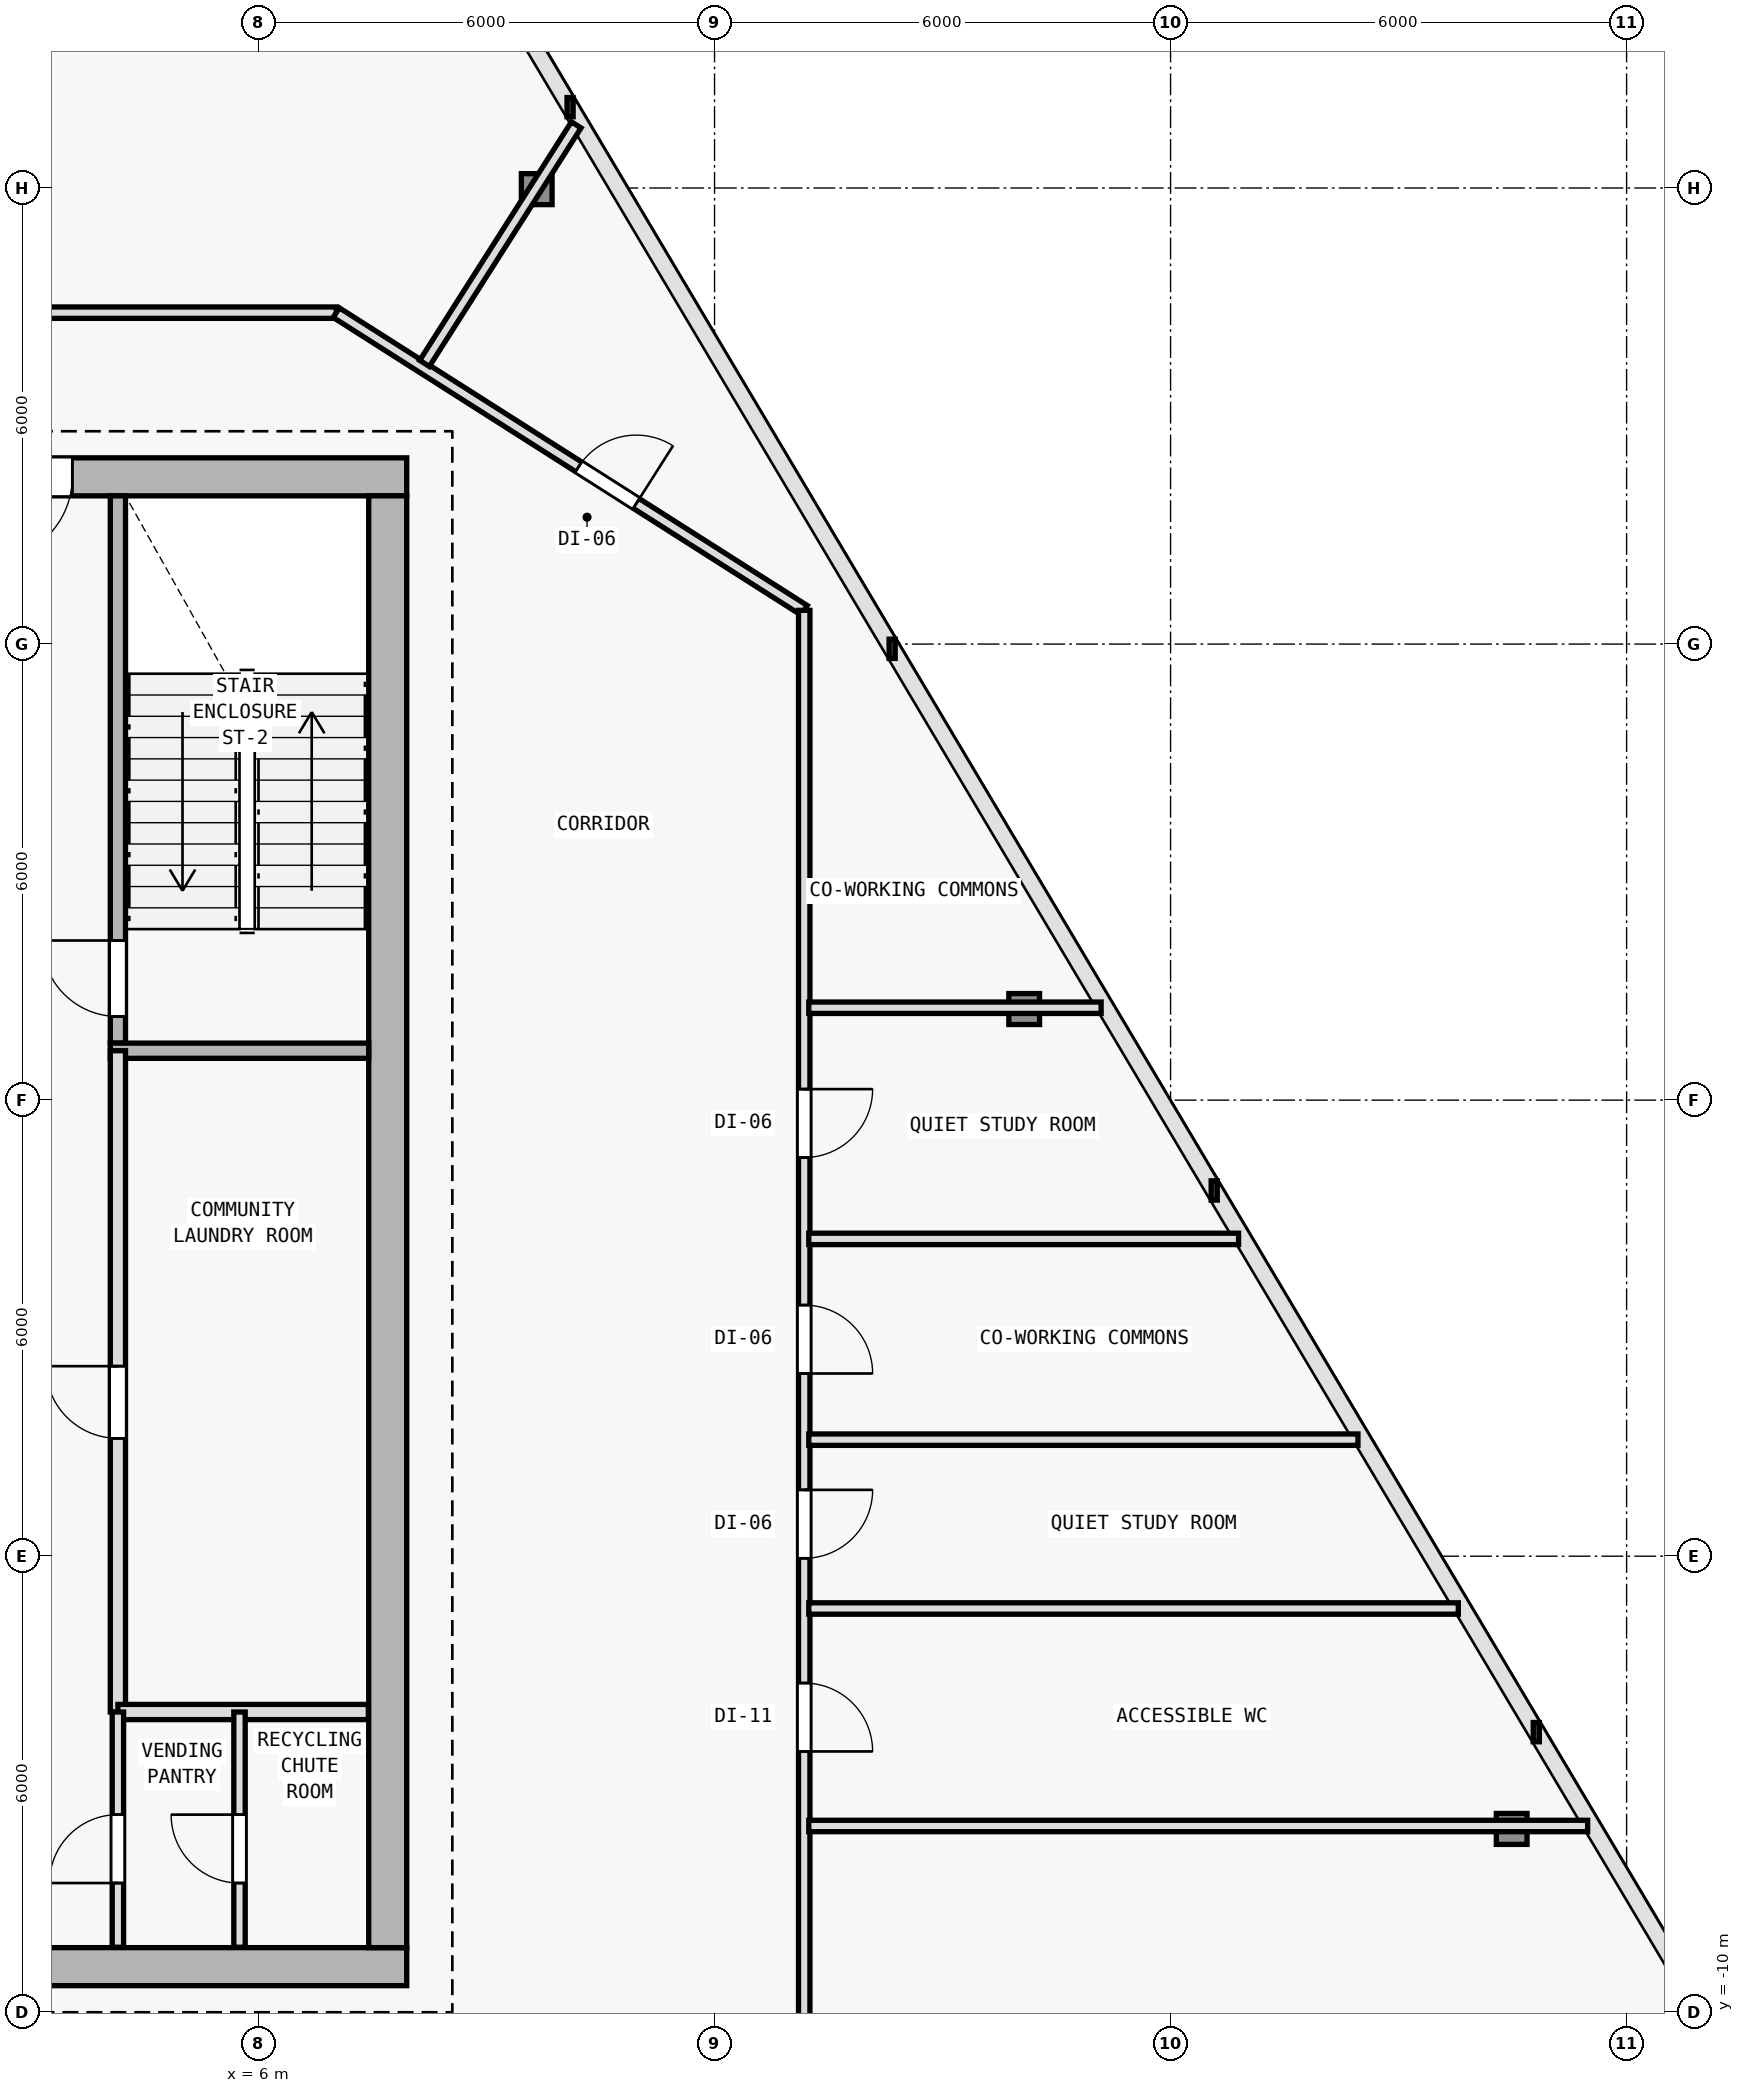
"""IFC4 building model, lengths in metres.
Left out: names, types, materials, properties, quantities, classifications, styles, units other than length and angle.
Written with IfcOpenShell. Run it as: python <this file> out.ifc"""

import sys

from ifc_helpers import new_model, si_unit, direction, frame, frame_2d, origin, origin_2d, place, context, subcontext, project, spatial, rectangle, i_section, extrude, element, fill, save


model = new_model("IFC4")
c1 = context("Model", 3, precision=1e-05, world=origin(), true_north=direction((0.0, 1.0)))
c2 = subcontext(c1, "Body", "Model", "MODEL_VIEW")
j1 = project(units=[si_unit("LENGTHUNIT", "METRE"), si_unit("PLANEANGLEUNIT", "RADIAN")], contexts=[c1])
p1 = place(None, origin())
s1 = spatial("IfcSite", under=j1, at=p1, CompositionType="ELEMENT")
p2 = place(p1, origin())
s2 = spatial("IfcBuilding", under=s1, at=p2, CompositionType="ELEMENT")
p3 = place(p2, frame((0.0, 0.0, 134.1)))
s3 = spatial("IfcBuildingStorey", under=s2, at=p3, CompositionType="ELEMENT", Elevation=134.1)
for number, where, z_axis, x_axis in (
    (1, (7.7, -9.4, 0.0), (0.0, 0.0, 1.0), (1.0, 0.0, 0.0)),
    (2, (7.7, 10.2, 0.0), (0.0, 0.0, 1.0), (1.0, 0.0, 0.0)),
    (3, (7.7, 0.4, 0.0), (0.0, 0.0, 1.0), (1.0, 0.0, 0.0)),
):
    element("IfcColumn", number, at=place(p3, frame(where, z_axis=z_axis, x_axis=x_axis)), inside=s3, PredefinedType="COLUMN", context=c2, shape_type="SweptSolid", body=[
        extrude(i_section(OverallWidth=0.409, OverallDepth=0.425, WebThickness=0.021, FlangeThickness=0.034, FilletRadius=0.015, at=origin_2d()), origin(), (0.0, 0.0, 1.0), 4.5),
    ])
p4 = place(p3, frame((22.488, -7.588, 0.005), z_axis=(-0.020876646911, 0.017288473223, 0.999632569651), x_axis=(-0.637813971185, -0.770190455771, 0.0)))
e4 = element("IfcColumn", 4, at=p4, inside=s3, PredefinedType="COLUMN", context=c2, shape_type="SweptSolid", body=[
    extrude(i_section(OverallWidth=0.404, OverallDepth=0.407, WebThickness=0.017, FlangeThickness=0.028, FilletRadius=0.015, at=origin_2d()), origin(), (0.0, 0.0, 1.0), 4.491),
])
p5 = place(p3, frame((16.074, 3.198, 0.005), z_axis=(-0.015117211909, 0.007612984415, 0.999856745925), x_axis=(-0.449781931574, -0.893138406984, 0.0)))
e5 = element("IfcColumn", 5, at=p5, inside=s3, PredefinedType="COLUMN", context=c2, shape_type="SweptSolid", body=[
    extrude(i_section(OverallWidth=0.404, OverallDepth=0.407, WebThickness=0.017, FlangeThickness=0.028, FilletRadius=0.015, at=origin_2d()), origin(), (0.0, 0.0, 1.0), 4.49),
])
p6 = place(p3, frame((9.66, 13.985, 0.005), z_axis=(-0.009408385968, -0.002012198155, 0.999953715595), x_axis=(0.209143047003, -0.977885057607, 0.0)))
e6 = element("IfcColumn", 6, at=p6, inside=s3, PredefinedType="COLUMN", context=c2, shape_type="SweptSolid", body=[
    extrude(i_section(OverallWidth=0.404, OverallDepth=0.407, WebThickness=0.017, FlangeThickness=0.028, FilletRadius=0.015, at=origin_2d()), origin(), (0.0, 0.0, 1.0), 4.489),
])
p7 = place(p3, frame((-7.95, -9.4, 0.0), z_axis=(0.0, 0.0, 1.0), x_axis=(1.0, 0.0, 0.0)))
e7 = element("IfcWall", 7, at=p7, inside=s3, PredefinedType="SHEAR", context=c2, shape_type="SweptSolid", body=[
    extrude(rectangle(XDim=15.9, YDim=0.5, at=frame_2d((7.95, 0.0))), origin(), (0.0, 0.0, 1.0), 4.25),
])
p8 = place(p7, frame((9.6, 0.0, 0.0)))
e8 = element("IfcOpeningElement", 8, at=p8, cuts=e7, PredefinedType="OPENING", context=c2, shape_type="SweptSolid", body=[
    extrude(rectangle(XDim=1.5, YDim=2.2, at=frame_2d((0.75, 1.1))), frame((0.0, 0.26, 0.0), z_axis=(0.0, -1.0, 0.0), x_axis=(1.0, 0.0, 0.0)), (0.0, 0.0, 1.0), 0.52),
])
p9 = place(p3, frame((7.95, 10.2, 0.0), z_axis=(0.0, 0.0, 1.0), x_axis=(-1.0, 0.0, 0.0)))
e9 = element("IfcWall", 9, at=p9, inside=s3, PredefinedType="SHEAR", context=c2, shape_type="SweptSolid", body=[
    extrude(rectangle(XDim=15.9, YDim=0.5, at=frame_2d((7.95, 0.0))), origin(), (0.0, 0.0, 1.0), 4.25),
])
p10 = place(p9, frame((4.4, 0.0, 0.0)))
e10 = element("IfcOpeningElement", 10, at=p10, cuts=e9, PredefinedType="OPENING", context=c2, shape_type="SweptSolid", body=[
    extrude(rectangle(XDim=1.1, YDim=2.15, at=frame_2d((0.55, 1.075))), frame((0.0, 0.26, 0.0), z_axis=(0.0, -1.0, 0.0), x_axis=(1.0, 0.0, 0.0)), (0.0, 0.0, 1.0), 0.52),
])
p11 = place(p3, frame((7.7, 9.95, 0.0), z_axis=(0.0, 0.0, 1.0), x_axis=(0.0, -1.0, 0.0)))
e11 = element("IfcWall", 11, at=p11, inside=s3, PredefinedType="SHEAR", context=c2, shape_type="SweptSolid", body=[
    extrude(rectangle(XDim=19.1, YDim=0.5, at=frame_2d((9.55, 0.0))), origin(), (0.0, 0.0, 1.0), 4.25),
])
p12 = place(p3, frame((4.15, 2.75, 0.0), z_axis=(0.0, 0.0, 1.0), x_axis=(0.0, 1.0, 0.0)))
e12 = element("IfcWall", 12, at=p12, inside=s3, PredefinedType="SOLIDWALL", context=c2, shape_type="SweptSolid", body=[
    extrude(rectangle(XDim=7.2, YDim=0.2, at=frame_2d((3.6, 0.0))), origin(), (0.0, 0.0, 1.0), 4.25),
])
p13 = place(p12, frame((0.35, 0.0, 0.0)))
e13 = element("IfcOpeningElement", 13, at=p13, cuts=e12, PredefinedType="OPENING", context=c2, shape_type="SweptSolid", body=[
    extrude(rectangle(XDim=1.0, YDim=2.15, at=frame_2d((0.5, 1.075))), frame((0.0, 0.11, 0.0), z_axis=(0.0, -1.0, 0.0), x_axis=(1.0, 0.0, 0.0)), (0.0, 0.0, 1.0), 0.22),
])
p14 = place(p3, frame((4.05, 2.65, 0.0), z_axis=(0.0, 0.0, 1.0), x_axis=(1.0, 0.0, 0.0)))
e14 = element("IfcWall", 14, at=p14, inside=s3, PredefinedType="SOLIDWALL", context=c2, shape_type="SweptSolid", body=[
    extrude(rectangle(XDim=3.4, YDim=0.2, at=frame_2d((1.7, 0.0))), origin(), (0.0, 0.0, 1.0), 4.25),
])
p15 = place(p3, frame((4.15, -6.05, 0.0), z_axis=(0.0, 0.0, 1.0), x_axis=(0.0, 1.0, 0.0)))
e15 = element("IfcWall", 15, at=p15, inside=s3, PredefinedType="SOLIDWALL", context=c2, shape_type="SweptSolid", body=[
    extrude(rectangle(XDim=8.7, YDim=0.2, at=frame_2d((4.35, 0.0))), origin(), (0.0, 0.0, 1.0), 4.25),
])
p16 = place(p15, frame((3.6, 0.0, 0.0)))
e16 = element("IfcOpeningElement", 16, at=p16, cuts=e15, PredefinedType="OPENING", context=c2, shape_type="SweptSolid", body=[
    extrude(rectangle(XDim=0.95, YDim=2.1, at=frame_2d((0.475, 1.05))), frame((0.0, 0.11, 0.0), z_axis=(0.0, -1.0, 0.0), x_axis=(1.0, 0.0, 0.0)), (0.0, 0.0, 1.0), 0.22),
])
p17 = place(p3, frame((4.15, -6.05, 0.0), z_axis=(0.0, 0.0, 1.0), x_axis=(1.0, 0.0, 0.0)))
e17 = element("IfcWall", 17, at=p17, inside=s3, PredefinedType="SOLIDWALL", context=c2, shape_type="SweptSolid", body=[
    extrude(rectangle(XDim=3.295, YDim=0.2, at=frame_2d((1.647, 0.0))), origin(), (0.0, 0.0, 1.0), 4.25),
])
p18 = place(p3, frame((4.15, -9.145, 0.0), z_axis=(0.0, 0.0, 1.0), x_axis=(0.0, 1.0, 0.0)))
e18 = element("IfcWall", 18, at=p18, inside=s3, PredefinedType="PARTITIONING", context=c2, shape_type="SweptSolid", body=[
    extrude(rectangle(XDim=3.095, YDim=0.15, at=frame_2d((1.547, 0.0))), origin(), (0.0, 0.0, 1.0), 4.25),
])
p19 = place(p18, frame((0.845, 0.0, 0.0)))
e19 = element("IfcOpeningElement", 19, at=p19, cuts=e18, PredefinedType="OPENING", context=c2, shape_type="SweptSolid", body=[
    extrude(rectangle(XDim=0.9, YDim=2.1, at=frame_2d((0.45, 1.05))), frame((0.0, 0.085, 0.0), z_axis=(0.0, -1.0, 0.0), x_axis=(1.0, 0.0, 0.0)), (0.0, 0.0, 1.0), 0.17),
])
p20 = place(p3, frame((5.75, -9.145, 0.0), z_axis=(0.0, 0.0, 1.0), x_axis=(0.0, 1.0, 0.0)))
e20 = element("IfcWall", 20, at=p20, inside=s3, PredefinedType="PARTITIONING", context=c2, shape_type="SweptSolid", body=[
    extrude(rectangle(XDim=3.095, YDim=0.15, at=frame_2d((1.547, 0.0))), origin(), (0.0, 0.0, 1.0), 4.25),
])
p21 = place(p20, frame((0.845, 0.0, 0.0)))
e21 = element("IfcOpeningElement", 21, at=p21, cuts=e20, PredefinedType="OPENING", context=c2, shape_type="SweptSolid", body=[
    extrude(rectangle(XDim=0.9, YDim=2.1, at=frame_2d((0.45, 1.05))), frame((0.0, 0.085, 0.0), z_axis=(0.0, -1.0, 0.0), x_axis=(1.0, 0.0, 0.0)), (0.0, 0.0, 1.0), 0.17),
])
p22 = place(p3, frame((-7.041, 12.36, 0.0), z_axis=(0.0, 0.0, 1.0), x_axis=(1.0, 0.0, 0.0)))
e22 = element("IfcWall", 22, at=p22, inside=s3, PredefinedType="PARTITIONING", context=c2, shape_type="SweptSolid", body=[
    extrude(rectangle(XDim=14.064, YDim=0.15, at=frame_2d((7.032, 0.0))), origin(), (0.0, 0.0, 1.0), 3.865),
])
p23 = place(p22, frame((6.582, 0.0, 0.0)))
e23 = element("IfcOpeningElement", 23, at=p23, cuts=e22, PredefinedType="OPENING", context=c2, shape_type="SweptSolid", body=[
    extrude(rectangle(XDim=0.9, YDim=2.1, at=frame_2d((0.45, 1.05))), frame((0.0, 0.085, 0.0), z_axis=(0.0, -1.0, 0.0), x_axis=(1.0, 0.0, 0.0)), (0.0, 0.0, 1.0), 0.17),
])
p24 = place(p3, frame((7.023, 12.36, 0.0), z_axis=(0.0, 0.0, 1.0), x_axis=(0.84376480085, -0.536713108511, 0.0)))
e24 = element("IfcWall", 24, at=p24, inside=s3, PredefinedType="PARTITIONING", context=c2, shape_type="SweptSolid", body=[
    extrude(rectangle(XDim=7.297, YDim=0.15, at=frame_2d((3.648, 0.0))), origin(), (0.0, 0.0, 1.0), 3.785),
])
p25 = place(p24, frame((3.778, 0.0, 0.0)))
e25 = element("IfcOpeningElement", 25, at=p25, cuts=e24, PredefinedType="OPENING", context=c2, shape_type="SweptSolid", body=[
    extrude(rectangle(XDim=0.9, YDim=2.1, at=frame_2d((0.45, 1.05))), frame((0.0, 0.085, 0.0), z_axis=(0.0, -1.0, 0.0), x_axis=(1.0, 0.0, 0.0)), (0.0, 0.0, 1.0), 0.17),
])
p26 = place(p3, frame((13.18, 8.444, 0.0), z_axis=(0.0, 0.0, 1.0), x_axis=(0.0, -1.0, 0.0)))
e26 = element("IfcWall", 26, at=p26, inside=s3, PredefinedType="PARTITIONING", context=c2, shape_type="SweptSolid", body=[
    extrude(rectangle(XDim=20.004, YDim=0.15, at=frame_2d((10.002, 0.0))), origin(), (0.0, 0.0, 1.0), 3.605),
])
p27 = place(p26, frame((14.113, 0.0, 0.0)))
e27 = element("IfcOpeningElement", 27, at=p27, cuts=e26, PredefinedType="OPENING", context=c2, shape_type="SweptSolid", body=[
    extrude(rectangle(XDim=0.9, YDim=2.1, at=frame_2d((0.45, 1.05))), frame((0.0, 0.085, 0.0), z_axis=(0.0, -1.0, 0.0), x_axis=(1.0, 0.0, 0.0)), (0.0, 0.0, 1.0), 0.17),
])
p28 = place(p26, frame((11.572, 0.0, 0.0)))
e28 = element("IfcOpeningElement", 28, at=p28, cuts=e26, PredefinedType="OPENING", context=c2, shape_type="SweptSolid", body=[
    extrude(rectangle(XDim=0.9, YDim=2.1, at=frame_2d((0.45, 1.05))), frame((0.0, 0.085, 0.0), z_axis=(0.0, -1.0, 0.0), x_axis=(1.0, 0.0, 0.0)), (0.0, 0.0, 1.0), 0.17),
])
p29 = place(p26, frame((9.14, 0.0, 0.0)))
e29 = element("IfcOpeningElement", 29, at=p29, cuts=e26, PredefinedType="OPENING", context=c2, shape_type="SweptSolid", body=[
    extrude(rectangle(XDim=0.9, YDim=2.1, at=frame_2d((0.45, 1.05))), frame((0.0, 0.085, 0.0), z_axis=(0.0, -1.0, 0.0), x_axis=(1.0, 0.0, 0.0)), (0.0, 0.0, 1.0), 0.17),
])
p30 = place(p26, frame((6.299, 0.0, 0.0)))
e30 = element("IfcOpeningElement", 30, at=p30, cuts=e26, PredefinedType="OPENING", context=c2, shape_type="SweptSolid", body=[
    extrude(rectangle(XDim=0.9, YDim=2.1, at=frame_2d((0.45, 1.05))), frame((0.0, 0.085, 0.0), z_axis=(0.0, -1.0, 0.0), x_axis=(1.0, 0.0, 0.0)), (0.0, 0.0, 1.0), 0.17),
])
p31 = place(p3, frame((13.24, -7.549, 0.0), z_axis=(0.0, 0.0, 1.0), x_axis=(1.0, 0.0, 0.0)))
e31 = element("IfcWall", 31, at=p31, inside=s3, PredefinedType="PARTITIONING", context=c2, shape_type="SweptSolid", body=[
    extrude(rectangle(XDim=10.247, YDim=0.15, at=frame_2d((5.124, 0.0))), origin(), (0.0, 0.0, 1.0), 3.605),
])
p32 = place(p3, frame((13.24, 3.216, 0.0), z_axis=(0.0, 0.0, 1.0), x_axis=(1.0, 0.0, 0.0)))
e32 = element("IfcWall", 32, at=p32, inside=s3, PredefinedType="PARTITIONING", context=c2, shape_type="SweptSolid", body=[
    extrude(rectangle(XDim=3.846, YDim=0.15, at=frame_2d((1.923, 0.0))), origin(), (0.0, 0.0, 1.0), 3.785),
])
p33 = place(p3, frame((8.184, 11.693, 0.0), z_axis=(0.0, 0.0, 1.0), x_axis=(0.536709805636, 0.843766901777, 0.0)))
e33 = element("IfcWall", 33, at=p33, inside=s3, PredefinedType="PARTITIONING", context=c2, shape_type="SweptSolid", body=[
    extrude(rectangle(XDim=3.719, YDim=0.15, at=frame_2d((1.859, 0.0))), origin(), (0.0, 0.0, 1.0), 3.785),
])
p34 = place(p3, frame((13.24, -2.467, 0.0), z_axis=(0.0, 0.0, 1.0), x_axis=(1.0, 0.0, 0.0)))
e34 = element("IfcWall", 34, at=p34, inside=s3, PredefinedType="PARTITIONING", context=c2, shape_type="SweptSolid", body=[
    extrude(rectangle(XDim=7.225, YDim=0.15, at=frame_2d((3.613, 0.0))), origin(), (0.0, 0.0, 1.0), 3.785),
])
p35 = place(p3, frame((13.24, -4.688, 0.0), z_axis=(0.0, 0.0, 1.0), x_axis=(1.0, 0.0, 0.0)))
e35 = element("IfcWall", 35, at=p35, inside=s3, PredefinedType="PARTITIONING", context=c2, shape_type="SweptSolid", body=[
    extrude(rectangle(XDim=8.546, YDim=0.15, at=frame_2d((4.273, 0.0))), origin(), (0.0, 0.0, 1.0), 3.785),
])
p36 = place(p3, frame((13.24, 0.174, 0.0), z_axis=(0.0, 0.0, 1.0), x_axis=(1.0, 0.0, 0.0)))
e36 = element("IfcWall", 36, at=p36, inside=s3, PredefinedType="PARTITIONING", context=c2, shape_type="SweptSolid", body=[
    extrude(rectangle(XDim=5.655, YDim=0.15, at=frame_2d((2.827, 0.0))), origin(), (0.0, 0.0, 1.0), 3.785),
])
p37 = place(p10, origin())
e37 = element("IfcDoor", 37, at=p37, inside=s3, OperationType="SINGLE_SWING_RIGHT", PredefinedType="DOOR", context=c2, shape_type="SweptSolid", body=[
    extrude(rectangle(XDim=1.1, YDim=2.15, at=frame_2d((0.55, 1.075))), frame((0.0, 0.025, 0.0), z_axis=(0.0, -1.0, 0.0), x_axis=(1.0, 0.0, 0.0)), (0.0, 0.0, 1.0), 0.05),
])
fill(e10, e37)
p38 = place(p13, origin())
e38 = element("IfcDoor", 38, at=p38, inside=s3, OperationType="SINGLE_SWING_RIGHT", PredefinedType="DOOR", context=c2, shape_type="SweptSolid", body=[
    extrude(rectangle(XDim=1.0, YDim=2.15, at=frame_2d((0.5, 1.075))), frame((0.0, 0.025, 0.0), z_axis=(0.0, -1.0, 0.0), x_axis=(1.0, 0.0, 0.0)), (0.0, 0.0, 1.0), 0.05),
])
fill(e13, e38)
p39 = place(p16, origin())
e39 = element("IfcDoor", 39, at=p39, inside=s3, OperationType="SINGLE_SWING_RIGHT", PredefinedType="DOOR", context=c2, shape_type="SweptSolid", body=[
    extrude(rectangle(XDim=0.95, YDim=2.1, at=frame_2d((0.475, 1.05))), frame((0.0, 0.025, 0.0), z_axis=(0.0, -1.0, 0.0), x_axis=(1.0, 0.0, 0.0)), (0.0, 0.0, 1.0), 0.05),
])
fill(e16, e39)
p40 = place(p19, origin())
e40 = element("IfcDoor", 40, at=p40, inside=s3, OperationType="SINGLE_SWING_LEFT", PredefinedType="DOOR", context=c2, shape_type="SweptSolid", body=[
    extrude(rectangle(XDim=0.9, YDim=2.1, at=frame_2d((0.45, 1.05))), frame((0.0, 0.025, 0.0), z_axis=(0.0, -1.0, 0.0), x_axis=(1.0, 0.0, 0.0)), (0.0, 0.0, 1.0), 0.05),
])
fill(e19, e40)
p41 = place(p21, origin())
e41 = element("IfcDoor", 41, at=p41, inside=s3, OperationType="SINGLE_SWING_RIGHT", PredefinedType="DOOR", context=c2, shape_type="SweptSolid", body=[
    extrude(rectangle(XDim=0.9, YDim=2.1, at=frame_2d((0.45, 1.05))), frame((0.0, 0.025, 0.0), z_axis=(0.0, -1.0, 0.0), x_axis=(1.0, 0.0, 0.0)), (0.0, 0.0, 1.0), 0.05),
])
fill(e21, e41)
p42 = place(p27, origin())
e42 = element("IfcDoor", 42, at=p42, inside=s3, OperationType="SINGLE_SWING_RIGHT", PredefinedType="DOOR", context=c2, shape_type="SweptSolid", body=[
    extrude(rectangle(XDim=0.9, YDim=2.1, at=frame_2d((0.45, 1.05))), frame((0.0, 0.025, 0.0), z_axis=(0.0, -1.0, 0.0), x_axis=(1.0, 0.0, 0.0)), (0.0, 0.0, 1.0), 0.05),
])
fill(e27, e42)
p43 = place(p28, origin())
e43 = element("IfcDoor", 43, at=p43, inside=s3, OperationType="SINGLE_SWING_LEFT", PredefinedType="DOOR", context=c2, shape_type="SweptSolid", body=[
    extrude(rectangle(XDim=0.9, YDim=2.1, at=frame_2d((0.45, 1.05))), frame((0.0, 0.025, 0.0), z_axis=(0.0, -1.0, 0.0), x_axis=(1.0, 0.0, 0.0)), (0.0, 0.0, 1.0), 0.05),
])
fill(e28, e43)
p44 = place(p29, origin())
e44 = element("IfcDoor", 44, at=p44, inside=s3, OperationType="SINGLE_SWING_RIGHT", PredefinedType="DOOR", context=c2, shape_type="SweptSolid", body=[
    extrude(rectangle(XDim=0.9, YDim=2.1, at=frame_2d((0.45, 1.05))), frame((0.0, 0.025, 0.0), z_axis=(0.0, -1.0, 0.0), x_axis=(1.0, 0.0, 0.0)), (0.0, 0.0, 1.0), 0.05),
])
fill(e29, e44)
p45 = place(p30, origin())
e45 = element("IfcDoor", 45, at=p45, inside=s3, OperationType="SINGLE_SWING_LEFT", PredefinedType="DOOR", context=c2, shape_type="SweptSolid", body=[
    extrude(rectangle(XDim=0.9, YDim=2.1, at=frame_2d((0.45, 1.05))), frame((0.0, 0.025, 0.0), z_axis=(0.0, -1.0, 0.0), x_axis=(1.0, 0.0, 0.0)), (0.0, 0.0, 1.0), 0.05),
])
fill(e30, e45)
p46 = place(p25, origin())
e46 = element("IfcDoor", 46, at=p46, inside=s3, OperationType="SINGLE_SWING_RIGHT", PredefinedType="DOOR", context=c2, shape_type="SweptSolid", body=[
    extrude(rectangle(XDim=0.9, YDim=2.1, at=frame_2d((0.45, 1.05))), frame((0.0, 0.025, 0.0), z_axis=(0.0, -1.0, 0.0), x_axis=(1.0, 0.0, 0.0)), (0.0, 0.0, 1.0), 0.05),
])
fill(e25, e46)
save(model, sys.argv[1])
